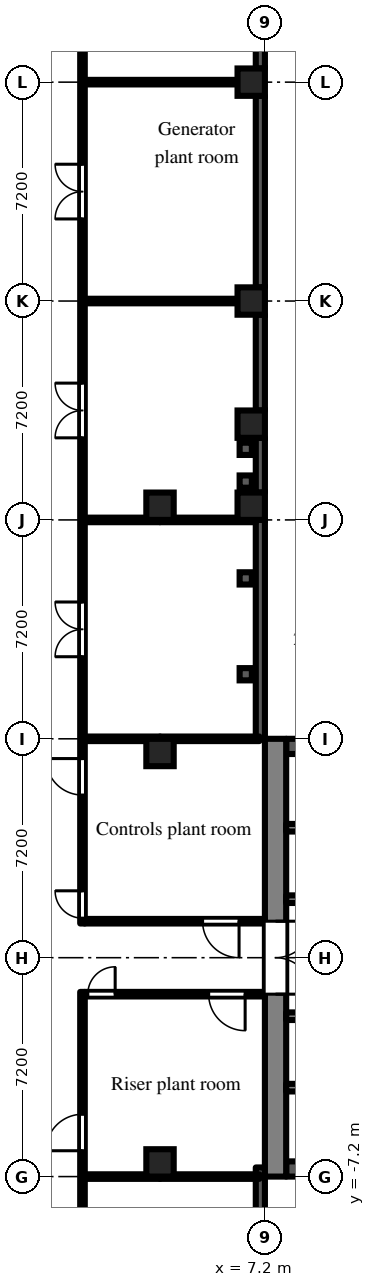
"""IFC4 building model, lengths in metres.
Left out: names, types, materials, properties, quantities, classifications, styles, units other than length and angle.
Written with IfcOpenShell. Run it as: python <this file> out.ifc"""

import sys

from ifc_helpers import new_model, si_unit, direction, frame, frame_2d, origin, origin_2d, place, context, subcontext, project, spatial, polyline, rectangle, outline, extrude, element, fill, save


model = new_model("IFC4")
c1 = context("Model", 3, precision=1e-05, world=origin(), true_north=direction((0.0, 1.0)))
c2 = subcontext(c1, "Body", "Model", "MODEL_VIEW")
j1 = project(units=[si_unit("LENGTHUNIT", "METRE"), si_unit("PLANEANGLEUNIT", "RADIAN")], contexts=[c1])
p1 = place(None, origin())
s1 = spatial("IfcSite", under=j1, at=p1, CompositionType="ELEMENT")
p2 = place(p1, origin())
s2 = spatial("IfcBuilding", under=s1, at=p2, CompositionType="ELEMENT")
p3 = place(p2, frame((0.0, 0.0, 62.7)))
s3 = spatial("IfcBuildingStorey", under=s2, at=p3, CompositionType="ELEMENT", Elevation=62.7)
for number, where, z_axis, x_axis in (
    (1, (3.75, -6.75, 0.0), (0.0, 0.0, 1.0), (1.0, 0.0, 0.0)),
    (2, (3.75, 6.75, 0.0), (0.0, 0.0, 1.0), (1.0, 0.0, 0.0)),
    (3, (3.75, 14.85, 0.0), (0.0, 0.0, 1.0), (1.0, 0.0, 0.0)),
    (4, (6.75, 14.85, 0.0), (0.0, 0.0, 1.0), (1.0, 0.0, 0.0)),
    (5, (6.75, 17.55, 0.0), (0.0, 0.0, 1.0), (1.0, 0.0, 0.0)),
    (6, (6.75, 21.6, 0.0), (0.0, 0.0, 1.0), (1.0, 0.0, 0.0)),
    (7, (6.75, 28.8, 0.0), (0.0, 0.0, 1.0), (1.0, 0.0, 0.0)),
):
    element("IfcColumn", number, at=place(p3, frame(where, z_axis=z_axis, x_axis=x_axis)), inside=s3, PredefinedType="COLUMN", context=c2, shape_type="SweptSolid", body=[
        extrude(rectangle(XDim=0.9, YDim=0.9, at=origin_2d()), origin(), (0.0, 0.0, 1.0), 4.2),
    ])
p4 = place(p3, frame((7.05, 7.2, 0.0), z_axis=(0.0, 0.0, 1.0), x_axis=(0.0, 1.0, 0.0)))
e8 = element("IfcWall", 8, at=p4, inside=s3, PredefinedType="SOLIDWALL", context=c2, shape_type="SweptSolid", body=[
    extrude(rectangle(XDim=7.2, YDim=0.3, at=frame_2d((3.6, 0.0))), origin(), (0.0, 0.0, 1.0), 3.775),
])
p5 = place(p3, frame((7.05, 15.3, 0.0), z_axis=(0.0, 0.0, 1.0), x_axis=(0.0, 1.0, 0.0)))
e9 = element("IfcWall", 9, at=p5, inside=s3, PredefinedType="SOLIDWALL", context=c2, shape_type="SweptSolid", body=[
    extrude(rectangle(XDim=1.8, YDim=0.3, at=frame_2d((0.9, 0.0))), origin(), (0.0, 0.0, 1.0), 3.3),
])
p6 = place(p3, frame((7.05, 18.0, 0.0), z_axis=(0.0, 0.0, 1.0), x_axis=(0.0, 1.0, 0.0)))
e10 = element("IfcWall", 10, at=p6, inside=s3, PredefinedType="SOLIDWALL", context=c2, shape_type="SweptSolid", body=[
    extrude(rectangle(XDim=3.15, YDim=0.3, at=frame_2d((1.575, 0.0))), origin(), (0.0, 0.0, 1.0), 3.775),
])
p7 = place(p3, frame((7.05, 22.05, 0.0), z_axis=(0.0, 0.0, 1.0), x_axis=(0.0, 1.0, 0.0)))
e11 = element("IfcWall", 11, at=p7, inside=s3, PredefinedType="SOLIDWALL", context=c2, shape_type="SweptSolid", body=[
    extrude(outline(polyline([(0.0, 0.0), (6.3, 0.0), (6.3, 3.775), (1.952, 3.775), (1.95, 3.4), (1.15, 3.4), (1.148, 3.775), (0.0, 3.775), (0.0, 0.0)])), frame((0.0, 0.15, 0.0), z_axis=(0.0, -1.0, 0.0), x_axis=(1.0, 0.0, 0.0)), (0.0, 0.0, 1.0), 0.3),
])
p8 = place(p3, frame((7.05, 29.25, 0.0), z_axis=(0.0, 0.0, 1.0), x_axis=(0.0, 1.0, 0.0)))
e12 = element("IfcWall", 12, at=p8, inside=s3, PredefinedType="SOLIDWALL", context=c2, shape_type="SweptSolid", body=[
    extrude(rectangle(XDim=6.3, YDim=0.3, at=frame_2d((3.15, 0.0))), origin(), (0.0, 0.0, 1.0), 3.775),
])
p9 = place(p3, frame((7.05, -14.4, 0.0), z_axis=(0.0, 0.0, 1.0), x_axis=(0.0, 1.0, 0.0)))
e13 = element("IfcWall", 13, at=p9, inside=s3, PredefinedType="SOLIDWALL", context=c2, shape_type="SweptSolid", body=[
    extrude(rectangle(XDim=7.5, YDim=0.3, at=frame_2d((3.75, 0.0))), origin(), (0.0, 0.0, 1.0), 3.775),
])
p10 = place(p3, frame((7.55, -7.2, 0.0), z_axis=(0.0, 0.0, 1.0), x_axis=(0.0, 1.0, 0.0)))
e14 = element("IfcWall", 14, at=p10, inside=s3, PredefinedType="SHEAR", context=c2, shape_type="SweptSolid", body=[
    extrude(rectangle(XDim=14.4, YDim=0.7, at=frame_2d((7.2, 0.0))), origin(), (0.0, 0.0, 1.0), 3.775),
])
p11 = place(p10, frame((6.0, 0.0, 0.0)))
e15 = element("IfcOpeningElement", 15, at=p11, cuts=e14, PredefinedType="OPENING", context=c2, shape_type="SweptSolid", body=[
    extrude(rectangle(XDim=2.4, YDim=2.2, at=frame_2d((1.2, 1.1))), frame((0.0, 0.36, 0.0), z_axis=(0.0, -1.0, 0.0), x_axis=(1.0, 0.0, 0.0)), (0.0, 0.0, 1.0), 0.72),
])
p12 = place(p3, frame((7.9, 6.95, 0.0), z_axis=(0.0, 0.0, 1.0), x_axis=(1.0, 0.0, 0.0)))
e16 = element("IfcWall", 16, at=p12, inside=s3, PredefinedType="SHEAR", context=c2, shape_type="SweptSolid", body=[
    extrude(rectangle(XDim=12.95, YDim=0.5, at=frame_2d((6.475, 0.0))), origin(), (0.0, 0.0, 1.0), 3.775),
])
p13 = place(p3, frame((7.9, 1.925, 0.0), z_axis=(0.0, 0.0, 1.0), x_axis=(1.0, 0.0, 0.0)))
e17 = element("IfcWall", 17, at=p13, inside=s3, PredefinedType="SHEAR", context=c2, shape_type="SweptSolid", body=[
    extrude(rectangle(XDim=12.95, YDim=0.25, at=frame_2d((6.475, 0.0))), origin(), (0.0, 0.0, 1.0), 3.775),
])
p14 = place(p13, frame((0.525, 0.0, 0.0)))
e18 = element("IfcOpeningElement", 18, at=p14, cuts=e17, PredefinedType="OPENING", context=c2, shape_type="SweptSolid", body=[
    extrude(rectangle(XDim=0.9, YDim=2.1, at=frame_2d((0.45, 1.05))), frame((0.0, 0.135, 0.0), z_axis=(0.0, -1.0, 0.0), x_axis=(1.0, 0.0, 0.0)), (0.0, 0.0, 1.0), 0.27),
])
p15 = place(p13, frame((2.625, 0.0, 0.0)))
e19 = element("IfcOpeningElement", 19, at=p15, cuts=e17, PredefinedType="OPENING", context=c2, shape_type="SweptSolid", body=[
    extrude(rectangle(XDim=1.1, YDim=2.1, at=frame_2d((0.55, 1.05))), frame((0.0, 0.135, 0.0), z_axis=(0.0, -1.0, 0.0), x_axis=(1.0, 0.0, 0.0)), (0.0, 0.0, 1.0), 0.27),
])
p16 = place(p13, frame((4.925, 0.0, 0.0)))
e20 = element("IfcOpeningElement", 20, at=p16, cuts=e17, PredefinedType="OPENING", context=c2, shape_type="SweptSolid", body=[
    extrude(rectangle(XDim=0.9, YDim=2.1, at=frame_2d((0.45, 1.05))), frame((0.0, 0.135, 0.0), z_axis=(0.0, -1.0, 0.0), x_axis=(1.0, 0.0, 0.0)), (0.0, 0.0, 1.0), 0.27),
])
p17 = place(p13, frame((8.225, 0.0, 0.0)))
e21 = element("IfcOpeningElement", 21, at=p17, cuts=e17, PredefinedType="OPENING", context=c2, shape_type="SweptSolid", body=[
    extrude(rectangle(XDim=0.9, YDim=2.1, at=frame_2d((0.45, 1.05))), frame((0.0, 0.135, 0.0), z_axis=(0.0, -1.0, 0.0), x_axis=(1.0, 0.0, 0.0)), (0.0, 0.0, 1.0), 0.27),
])
p18 = place(p3, frame((7.9, 4.275, 0.0), z_axis=(0.0, 0.0, 1.0), x_axis=(1.0, 0.0, 0.0)))
e22 = element("IfcWall", 22, at=p18, inside=s3, PredefinedType="SHEAR", context=c2, shape_type="SweptSolid", body=[
    extrude(rectangle(XDim=1.95, YDim=0.25, at=frame_2d((0.975, 0.0))), origin(), (0.0, 0.0, 1.0), 3.775),
])
p19 = place(p3, frame((7.9, -6.95, 0.0), z_axis=(0.0, 0.0, 1.0), x_axis=(1.0, 0.0, 0.0)))
e23 = element("IfcWall", 23, at=p19, inside=s3, PredefinedType="SHEAR", context=c2, shape_type="SweptSolid", body=[
    extrude(rectangle(XDim=12.95, YDim=0.5, at=frame_2d((6.475, 0.0))), origin(), (0.0, 0.0, 1.0), 3.775),
])
p20 = place(p3, frame((7.9, -1.925, 0.0), z_axis=(0.0, 0.0, 1.0), x_axis=(1.0, 0.0, 0.0)))
e24 = element("IfcWall", 24, at=p20, inside=s3, PredefinedType="SHEAR", context=c2, shape_type="SweptSolid", body=[
    extrude(rectangle(XDim=12.95, YDim=0.25, at=frame_2d((6.475, 0.0))), origin(), (0.0, 0.0, 1.0), 3.775),
])
p21 = place(p20, frame((4.825, 0.0, 0.0)))
e25 = element("IfcOpeningElement", 25, at=p21, cuts=e24, PredefinedType="OPENING", context=c2, shape_type="SweptSolid", body=[
    extrude(rectangle(XDim=1.1, YDim=2.1, at=frame_2d((0.55, 1.05))), frame((0.0, 0.135, 0.0), z_axis=(0.0, -1.0, 0.0), x_axis=(1.0, 0.0, 0.0)), (0.0, 0.0, 1.0), 0.27),
])
p22 = place(p20, frame((7.025, 0.0, 0.0)))
e26 = element("IfcOpeningElement", 26, at=p22, cuts=e24, PredefinedType="OPENING", context=c2, shape_type="SweptSolid", body=[
    extrude(rectangle(XDim=1.1, YDim=2.1, at=frame_2d((0.55, 1.05))), frame((0.0, 0.135, 0.0), z_axis=(0.0, -1.0, 0.0), x_axis=(1.0, 0.0, 0.0)), (0.0, 0.0, 1.0), 0.27),
])
p23 = place(p20, frame((9.225, 0.0, 0.0)))
e27 = element("IfcOpeningElement", 27, at=p23, cuts=e24, PredefinedType="OPENING", context=c2, shape_type="SweptSolid", body=[
    extrude(rectangle(XDim=1.1, YDim=2.1, at=frame_2d((0.55, 1.05))), frame((0.0, 0.135, 0.0), z_axis=(0.0, -1.0, 0.0), x_axis=(1.0, 0.0, 0.0)), (0.0, 0.0, 1.0), 0.27),
])
p24 = place(p20, frame((0.525, 0.0, 0.0)))
e28 = element("IfcOpeningElement", 28, at=p24, cuts=e24, PredefinedType="OPENING", context=c2, shape_type="SweptSolid", body=[
    extrude(rectangle(XDim=0.9, YDim=2.1, at=frame_2d((0.45, 1.05))), frame((0.0, 0.135, 0.0), z_axis=(0.0, -1.0, 0.0), x_axis=(1.0, 0.0, 0.0)), (0.0, 0.0, 1.0), 0.27),
])
p25 = place(p20, frame((2.625, 0.0, 0.0)))
e29 = element("IfcOpeningElement", 29, at=p25, cuts=e24, PredefinedType="OPENING", context=c2, shape_type="SweptSolid", body=[
    extrude(rectangle(XDim=1.1, YDim=2.1, at=frame_2d((0.55, 1.05))), frame((0.0, 0.135, 0.0), z_axis=(0.0, -1.0, 0.0), x_axis=(1.0, 0.0, 0.0)), (0.0, 0.0, 1.0), 0.27),
])
p26 = place(p3, frame((7.9, -4.275, 0.0), z_axis=(0.0, 0.0, 1.0), x_axis=(1.0, 0.0, 0.0)))
e30 = element("IfcWall", 30, at=p26, inside=s3, PredefinedType="SHEAR", context=c2, shape_type="SweptSolid", body=[
    extrude(rectangle(XDim=1.95, YDim=0.25, at=frame_2d((0.975, 0.0))), origin(), (0.0, 0.0, 1.0), 3.775),
])
p27 = place(p3, frame((1.2, -36.5, 0.0), z_axis=(0.0, 0.0, 1.0), x_axis=(0.0, 1.0, 0.0)))
e31 = element("IfcWall", 31, at=p27, inside=s3, PredefinedType="PARTITIONING", context=c2, shape_type="SweptSolid", body=[
    extrude(rectangle(XDim=35.375, YDim=0.15, at=frame_2d((17.688, 0.0))), origin(), (0.0, 0.0, 1.0), 3.775),
])
p28 = place(p27, frame((30.15, 0.0, 0.0)))
e32 = element("IfcOpeningElement", 32, at=p28, cuts=e31, PredefinedType="OPENING", context=c2, shape_type="SweptSolid", body=[
    extrude(rectangle(XDim=1.2, YDim=2.1, at=frame_2d((0.6, 1.05))), frame((0.0, 0.085, 0.0), z_axis=(0.0, -1.0, 0.0), x_axis=(1.0, 0.0, 0.0)), (0.0, 0.0, 1.0), 0.17),
])
p29 = place(p27, frame((24.8, 0.0, 0.0)))
e33 = element("IfcOpeningElement", 33, at=p29, cuts=e31, PredefinedType="OPENING", context=c2, shape_type="SweptSolid", body=[
    extrude(rectangle(XDim=1.8, YDim=2.1, at=frame_2d((0.9, 1.05))), frame((0.0, 0.085, 0.0), z_axis=(0.0, -1.0, 0.0), x_axis=(1.0, 0.0, 0.0)), (0.0, 0.0, 1.0), 0.17),
])
p30 = place(p27, frame((17.6, 0.0, 0.0)))
e34 = element("IfcOpeningElement", 34, at=p30, cuts=e31, PredefinedType="OPENING", context=c2, shape_type="SweptSolid", body=[
    extrude(rectangle(XDim=1.8, YDim=2.1, at=frame_2d((0.9, 1.05))), frame((0.0, 0.085, 0.0), z_axis=(0.0, -1.0, 0.0), x_axis=(1.0, 0.0, 0.0)), (0.0, 0.0, 1.0), 0.17),
])
p31 = place(p27, frame((10.4, 0.0, 0.0)))
e35 = element("IfcOpeningElement", 35, at=p31, cuts=e31, PredefinedType="OPENING", context=c2, shape_type="SweptSolid", body=[
    extrude(rectangle(XDim=1.8, YDim=2.1, at=frame_2d((0.9, 1.05))), frame((0.0, 0.085, 0.0), z_axis=(0.0, -1.0, 0.0), x_axis=(1.0, 0.0, 0.0)), (0.0, 0.0, 1.0), 0.17),
])
p32 = place(p27, frame((2.95, 0.0, 0.0)))
e36 = element("IfcOpeningElement", 36, at=p32, cuts=e31, PredefinedType="OPENING", context=c2, shape_type="SweptSolid", body=[
    extrude(rectangle(XDim=1.8, YDim=2.1, at=frame_2d((0.9, 1.05))), frame((0.0, 0.085, 0.0), z_axis=(0.0, -1.0, 0.0), x_axis=(1.0, 0.0, 0.0)), (0.0, 0.0, 1.0), 0.17),
])
p33 = place(p3, frame((1.275, -7.2, 0.0), z_axis=(0.0, 0.0, 1.0), x_axis=(1.0, 0.0, 0.0)))
e37 = element("IfcWall", 37, at=p33, inside=s3, PredefinedType="PARTITIONING", context=c2, shape_type="SweptSolid", body=[
    extrude(rectangle(XDim=2.475, YDim=0.15, at=frame_2d((1.238, 0.0))), origin(), (0.0, 0.0, 1.0), 3.775),
])
p34 = place(p3, frame((1.275, -1.2, 0.0), z_axis=(0.0, 0.0, 1.0), x_axis=(1.0, 0.0, 0.0)))
e38 = element("IfcWall", 38, at=p34, inside=s3, PredefinedType="PARTITIONING", context=c2, shape_type="SweptSolid", body=[
    extrude(rectangle(XDim=5.925, YDim=0.15, at=frame_2d((2.962, 0.0))), origin(), (0.0, 0.0, 1.0), 3.775),
])
p35 = place(p34, frame((0.1, 0.0, 0.0)))
e39 = element("IfcOpeningElement", 39, at=p35, cuts=e38, PredefinedType="OPENING", context=c2, shape_type="SweptSolid", body=[
    extrude(rectangle(XDim=0.9, YDim=2.1, at=frame_2d((0.45, 1.05))), frame((0.0, 0.085, 0.0), z_axis=(0.0, -1.0, 0.0), x_axis=(1.0, 0.0, 0.0)), (0.0, 0.0, 1.0), 0.17),
])
p36 = place(p34, frame((4.075, 0.0, 0.0)))
e40 = element("IfcOpeningElement", 40, at=p36, cuts=e38, PredefinedType="OPENING", context=c2, shape_type="SweptSolid", body=[
    extrude(rectangle(XDim=1.2, YDim=2.1, at=frame_2d((0.6, 1.05))), frame((0.0, 0.085, 0.0), z_axis=(0.0, -1.0, 0.0), x_axis=(1.0, 0.0, 0.0)), (0.0, 0.0, 1.0), 0.17),
])
p37 = place(p3, frame((1.2, 1.125, 0.0), z_axis=(0.0, 0.0, 1.0), x_axis=(0.0, 1.0, 0.0)))
e41 = element("IfcWall", 41, at=p37, inside=s3, PredefinedType="PARTITIONING", context=c2, shape_type="SweptSolid", body=[
    extrude(outline(polyline([(0.0, 0.0), (35.375, 0.0), (35.375, 3.775), (22.877, 3.775), (22.875, 3.4), (22.075, 3.4), (22.073, 3.775), (0.0, 3.775), (0.0, 0.0)])), frame((0.0, 0.075, 0.0), z_axis=(0.0, -1.0, 0.0), x_axis=(1.0, 0.0, 0.0)), (0.0, 0.0, 1.0), 0.15),
])
p38 = place(p37, frame((0.175, 0.0, 0.0)))
e42 = element("IfcOpeningElement", 42, at=p38, cuts=e41, PredefinedType="OPENING", context=c2, shape_type="SweptSolid", body=[
    extrude(rectangle(XDim=0.9, YDim=2.1, at=frame_2d((0.45, 1.05))), frame((0.0, 0.085, 0.0), z_axis=(0.0, -1.0, 0.0), x_axis=(1.0, 0.0, 0.0)), (0.0, 0.0, 1.0), 0.17),
])
p39 = place(p37, frame((4.225, 0.0, 0.0)))
e43 = element("IfcOpeningElement", 43, at=p39, cuts=e41, PredefinedType="OPENING", context=c2, shape_type="SweptSolid", body=[
    extrude(rectangle(XDim=1.2, YDim=2.1, at=frame_2d((0.6, 1.05))), frame((0.0, 0.085, 0.0), z_axis=(0.0, -1.0, 0.0), x_axis=(1.0, 0.0, 0.0)), (0.0, 0.0, 1.0), 0.17),
])
p40 = place(p37, frame((8.775, 0.0, 0.0)))
e44 = element("IfcOpeningElement", 44, at=p40, cuts=e41, PredefinedType="OPENING", context=c2, shape_type="SweptSolid", body=[
    extrude(rectangle(XDim=1.8, YDim=2.1, at=frame_2d((0.9, 1.05))), frame((0.0, 0.085, 0.0), z_axis=(0.0, -1.0, 0.0), x_axis=(1.0, 0.0, 0.0)), (0.0, 0.0, 1.0), 0.17),
])
p41 = place(p37, frame((15.975, 0.0, 0.0)))
e45 = element("IfcOpeningElement", 45, at=p41, cuts=e41, PredefinedType="OPENING", context=c2, shape_type="SweptSolid", body=[
    extrude(rectangle(XDim=1.8, YDim=2.1, at=frame_2d((0.9, 1.05))), frame((0.0, 0.085, 0.0), z_axis=(0.0, -1.0, 0.0), x_axis=(1.0, 0.0, 0.0)), (0.0, 0.0, 1.0), 0.17),
])
p42 = place(p37, frame((23.175, 0.0, 0.0)))
e46 = element("IfcOpeningElement", 46, at=p42, cuts=e41, PredefinedType="OPENING", context=c2, shape_type="SweptSolid", body=[
    extrude(rectangle(XDim=1.8, YDim=2.1, at=frame_2d((0.9, 1.05))), frame((0.0, 0.085, 0.0), z_axis=(0.0, -1.0, 0.0), x_axis=(1.0, 0.0, 0.0)), (0.0, 0.0, 1.0), 0.17),
])
p43 = place(p37, frame((30.625, 0.0, 0.0)))
e47 = element("IfcOpeningElement", 47, at=p43, cuts=e41, PredefinedType="OPENING", context=c2, shape_type="SweptSolid", body=[
    extrude(rectangle(XDim=1.8, YDim=2.1, at=frame_2d((0.9, 1.05))), frame((0.0, 0.085, 0.0), z_axis=(0.0, -1.0, 0.0), x_axis=(1.0, 0.0, 0.0)), (0.0, 0.0, 1.0), 0.17),
])
p44 = place(p3, frame((1.275, 1.2, 0.0), z_axis=(0.0, 0.0, 1.0), x_axis=(1.0, 0.0, 0.0)))
e48 = element("IfcWall", 48, at=p44, inside=s3, PredefinedType="PARTITIONING", context=c2, shape_type="SweptSolid", body=[
    extrude(rectangle(XDim=5.925, YDim=0.15, at=frame_2d((2.962, 0.0))), origin(), (0.0, 0.0, 1.0), 3.775),
])
p45 = place(p44, frame((3.875, 0.0, 0.0)))
e49 = element("IfcOpeningElement", 49, at=p45, cuts=e48, PredefinedType="OPENING", context=c2, shape_type="SweptSolid", body=[
    extrude(rectangle(XDim=1.2, YDim=2.1, at=frame_2d((0.6, 1.05))), frame((0.0, 0.085, 0.0), z_axis=(0.0, -1.0, 0.0), x_axis=(1.0, 0.0, 0.0)), (0.0, 0.0, 1.0), 0.17),
])
for number, where, z_axis, x_axis in (
    (50, (1.275, 7.2, 0.0), (0.0, 0.0, 1.0), (1.0, 0.0, 0.0)),
    (51, (1.275, 14.4, 0.0), (0.0, 0.0, 1.0), (1.0, 0.0, 0.0)),
):
    element("IfcWall", number, at=place(p3, frame(where, z_axis=z_axis, x_axis=x_axis)), inside=s3, PredefinedType="PARTITIONING", context=c2, shape_type="SweptSolid", body=[
        extrude(rectangle(XDim=2.475, YDim=0.15, at=frame_2d((1.238, 0.0))), origin(), (0.0, 0.0, 1.0), 3.775),
    ])
p46 = place(p3, frame((1.275, 21.6, 0.0), z_axis=(0.0, 0.0, 1.0), x_axis=(1.0, 0.0, 0.0)))
e52 = element("IfcWall", 52, at=p46, inside=s3, PredefinedType="PARTITIONING", context=c2, shape_type="SweptSolid", body=[
    extrude(rectangle(XDim=5.625, YDim=0.15, at=frame_2d((2.812, 0.0))), origin(), (0.0, 0.0, 1.0), 2.175),
])
p47 = place(p3, frame((1.275, 28.8, 0.0), z_axis=(0.0, 0.0, 1.0), x_axis=(1.0, 0.0, 0.0)))
e53 = element("IfcWall", 53, at=p47, inside=s3, PredefinedType="PARTITIONING", context=c2, shape_type="SweptSolid", body=[
    extrude(rectangle(XDim=5.625, YDim=0.15, at=frame_2d((2.812, 0.0))), origin(), (0.0, 0.0, 1.0), 3.775),
])
for number, where, z_axis, x_axis in (
    (54, (3.75, -7.2, 0.0), (0.0, 0.0, 1.0), (1.0, 0.0, 0.0)),
    (55, (3.75, 7.2, 0.0), (0.0, 0.0, 1.0), (1.0, 0.0, 0.0)),
):
    element("IfcWall", number, at=place(p3, frame(where, z_axis=z_axis, x_axis=x_axis)), inside=s3, PredefinedType="PARTITIONING", context=c2, shape_type="SweptSolid", body=[
        extrude(rectangle(XDim=3.27, YDim=0.15, at=frame_2d((1.635, 0.0))), origin(), (0.0, 0.0, 1.0), 3.3),
    ])
p48 = place(p3, frame((3.75, 14.4, 0.0), z_axis=(0.0, 0.0, 1.0), x_axis=(1.0, 0.0, 0.0)))
e56 = element("IfcWall", 56, at=p48, inside=s3, PredefinedType="PARTITIONING", context=c2, shape_type="SweptSolid", body=[
    extrude(rectangle(XDim=3.15, YDim=0.15, at=frame_2d((1.575, 0.0))), origin(), (0.0, 0.0, 1.0), 3.3),
])
p49 = place(p11, frame((2.4, 0.0, 0.0), z_axis=(0.0, 0.0, 1.0), x_axis=(-1.0, 0.0, 0.0)))
e57 = element("IfcDoor", 57, at=p49, inside=s3, OperationType="DOUBLE_DOOR_DOUBLE_SWING", PredefinedType="DOOR", context=c2, shape_type="SweptSolid", body=[
    extrude(rectangle(XDim=2.4, YDim=2.2, at=frame_2d((1.2, 1.1))), frame((0.0, 0.025, 0.0), z_axis=(0.0, -1.0, 0.0), x_axis=(1.0, 0.0, 0.0)), (0.0, 0.0, 1.0), 0.05),
])
fill(e15, e57)
p50 = place(p38, origin())
e58 = element("IfcDoor", 58, at=p50, inside=s3, OperationType="SINGLE_SWING_RIGHT", PredefinedType="DOOR", context=c2, shape_type="SweptSolid", body=[
    extrude(rectangle(XDim=0.9, YDim=2.1, at=frame_2d((0.45, 1.05))), frame((0.0, 0.025, 0.0), z_axis=(0.0, -1.0, 0.0), x_axis=(1.0, 0.0, 0.0)), (0.0, 0.0, 1.0), 0.05),
])
fill(e42, e58)
p51 = place(p39, origin())
e59 = element("IfcDoor", 59, at=p51, inside=s3, OperationType="SINGLE_SWING_RIGHT", PredefinedType="DOOR", context=c2, shape_type="SweptSolid", body=[
    extrude(rectangle(XDim=1.2, YDim=2.1, at=frame_2d((0.6, 1.05))), frame((0.0, 0.025, 0.0), z_axis=(0.0, -1.0, 0.0), x_axis=(1.0, 0.0, 0.0)), (0.0, 0.0, 1.0), 0.05),
])
fill(e43, e59)
p52 = place(p45, frame((1.2, 0.0, 0.0), z_axis=(0.0, 0.0, 1.0), x_axis=(-1.0, 0.0, 0.0)))
e60 = element("IfcDoor", 60, at=p52, inside=s3, OperationType="SINGLE_SWING_LEFT", PredefinedType="DOOR", context=c2, shape_type="SweptSolid", body=[
    extrude(rectangle(XDim=1.2, YDim=2.1, at=frame_2d((0.6, 1.05))), frame((0.0, 0.025, 0.0), z_axis=(0.0, -1.0, 0.0), x_axis=(1.0, 0.0, 0.0)), (0.0, 0.0, 1.0), 0.05),
])
fill(e49, e60)
p53 = place(p28, origin())
e61 = element("IfcDoor", 61, at=p53, inside=s3, OperationType="SINGLE_SWING_LEFT", PredefinedType="DOOR", context=c2, shape_type="SweptSolid", body=[
    extrude(rectangle(XDim=1.2, YDim=2.1, at=frame_2d((0.6, 1.05))), frame((0.0, 0.025, 0.0), z_axis=(0.0, -1.0, 0.0), x_axis=(1.0, 0.0, 0.0)), (0.0, 0.0, 1.0), 0.05),
])
fill(e32, e61)
p54 = place(p35, origin())
e62 = element("IfcDoor", 62, at=p54, inside=s3, OperationType="SINGLE_SWING_RIGHT", PredefinedType="DOOR", context=c2, shape_type="SweptSolid", body=[
    extrude(rectangle(XDim=0.9, YDim=2.1, at=frame_2d((0.45, 1.05))), frame((0.0, 0.025, 0.0), z_axis=(0.0, -1.0, 0.0), x_axis=(1.0, 0.0, 0.0)), (0.0, 0.0, 1.0), 0.05),
])
fill(e39, e62)
p55 = place(p36, frame((1.2, 0.0, 0.0), z_axis=(0.0, 0.0, 1.0), x_axis=(-1.0, 0.0, 0.0)))
e63 = element("IfcDoor", 63, at=p55, inside=s3, OperationType="SINGLE_SWING_LEFT", PredefinedType="DOOR", context=c2, shape_type="SweptSolid", body=[
    extrude(rectangle(XDim=1.2, YDim=2.1, at=frame_2d((0.6, 1.05))), frame((0.0, 0.025, 0.0), z_axis=(0.0, -1.0, 0.0), x_axis=(1.0, 0.0, 0.0)), (0.0, 0.0, 1.0), 0.05),
])
fill(e40, e63)
p56 = place(p40, origin())
e64 = element("IfcDoor", 64, at=p56, inside=s3, OperationType="DOUBLE_DOOR_DOUBLE_SWING", PredefinedType="DOOR", context=c2, shape_type="SweptSolid", body=[
    extrude(rectangle(XDim=1.8, YDim=2.1, at=frame_2d((0.9, 1.05))), frame((0.0, 0.025, 0.0), z_axis=(0.0, -1.0, 0.0), x_axis=(1.0, 0.0, 0.0)), (0.0, 0.0, 1.0), 0.05),
])
fill(e44, e64)
p57 = place(p41, origin())
e65 = element("IfcDoor", 65, at=p57, inside=s3, OperationType="DOUBLE_DOOR_DOUBLE_SWING", PredefinedType="DOOR", context=c2, shape_type="SweptSolid", body=[
    extrude(rectangle(XDim=1.8, YDim=2.1, at=frame_2d((0.9, 1.05))), frame((0.0, 0.025, 0.0), z_axis=(0.0, -1.0, 0.0), x_axis=(1.0, 0.0, 0.0)), (0.0, 0.0, 1.0), 0.05),
])
fill(e45, e65)
p58 = place(p42, origin())
e66 = element("IfcDoor", 66, at=p58, inside=s3, OperationType="DOUBLE_DOOR_DOUBLE_SWING", PredefinedType="DOOR", context=c2, shape_type="SweptSolid", body=[
    extrude(rectangle(XDim=1.8, YDim=2.1, at=frame_2d((0.9, 1.05))), frame((0.0, 0.025, 0.0), z_axis=(0.0, -1.0, 0.0), x_axis=(1.0, 0.0, 0.0)), (0.0, 0.0, 1.0), 0.05),
])
fill(e46, e66)
save(model, sys.argv[1])
